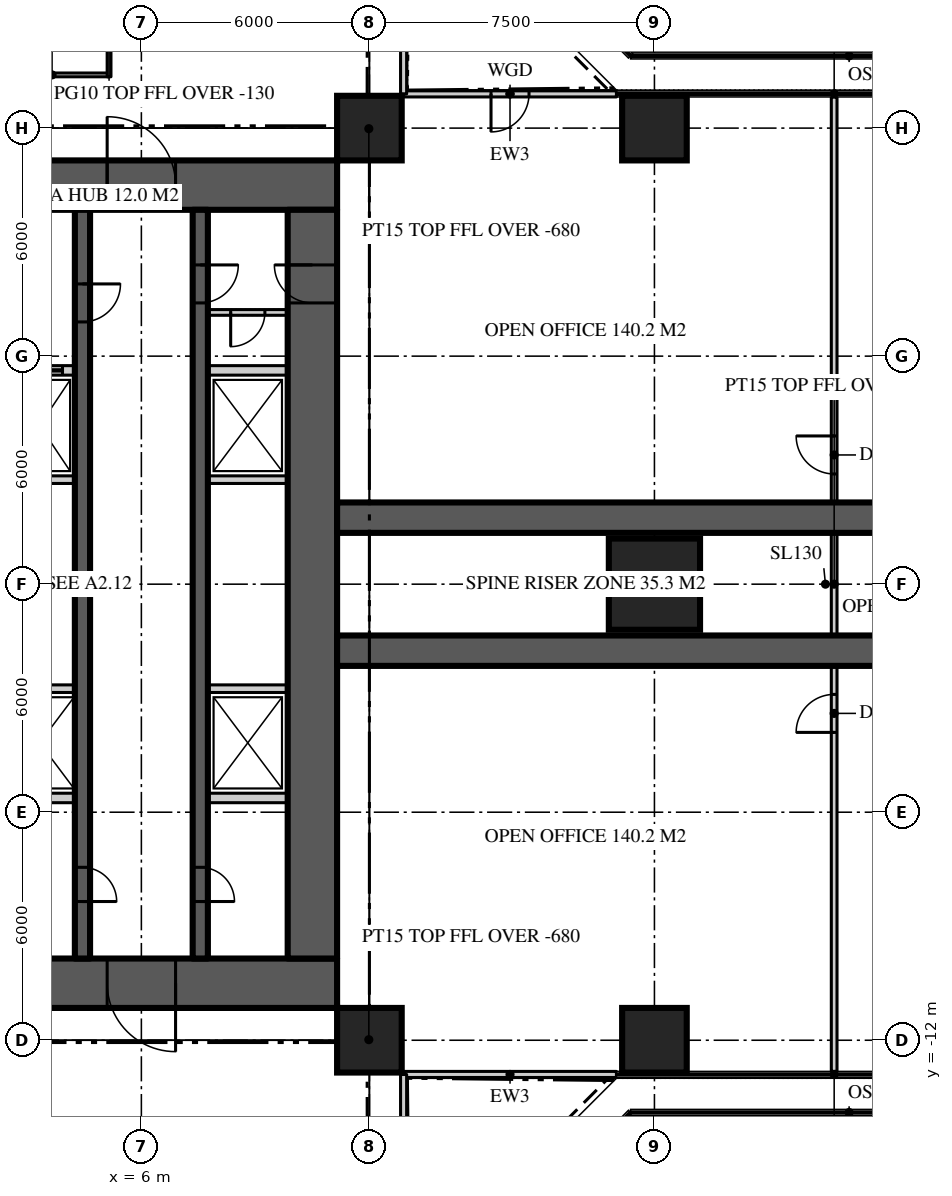
"""IFC4 building model, lengths in metres.
Left out: names, types, materials, properties, quantities, classifications, styles, units other than length and angle.
Written with IfcOpenShell. Run it as: python <this file> out.ifc"""

import sys

from ifc_helpers import new_model, si_unit, direction, frame, frame_2d, origin, origin_2d, place, context, subcontext, project, spatial, rectangle, extrude, element, fill, save


model = new_model("IFC4")
c1 = context("Model", 3, precision=1e-05, world=origin(), true_north=direction((0.0, 1.0)))
c2 = subcontext(c1, "Body", "Model", "MODEL_VIEW")
j1 = project(units=[si_unit("LENGTHUNIT", "METRE"), si_unit("PLANEANGLEUNIT", "RADIAN")], contexts=[c1])
p1 = place(None, origin())
s1 = spatial("IfcSite", under=j1, at=p1, CompositionType="ELEMENT")
p2 = place(p1, origin())
s2 = spatial("IfcBuilding", under=s1, at=p2, CompositionType="ELEMENT")
p3 = place(p2, frame((0.0, 0.0, 74.7)))
s3 = spatial("IfcBuildingStorey", under=s2, at=p3, CompositionType="ELEMENT", Elevation=74.7)
p4 = place(p3, frame((-11.15, 10.5, 0.0), z_axis=(0.0, 0.0, 1.0), x_axis=(1.0, 0.0, 0.0)))
e1 = element("IfcWall", 1, at=p4, inside=s3, PredefinedType="SHEAR", context=c2, shape_type="SweptSolid", body=[
    extrude(rectangle(XDim=22.3, YDim=1.3, at=frame_2d((11.15, 0.0))), origin(), (0.0, 0.0, 1.0), 3.9),
])
p5 = place(p4, frame((4.25, 0.0, 0.0)))
e2 = element("IfcOpeningElement", 2, at=p5, cuts=e1, PredefinedType="OPENING", context=c2, shape_type="SweptSolid", body=[
    extrude(rectangle(XDim=1.8, YDim=2.2, at=frame_2d((0.9, 1.1))), frame((0.0, 0.66, 0.0), z_axis=(0.0, -1.0, 0.0), x_axis=(1.0, 0.0, 0.0)), (0.0, 0.0, 1.0), 1.32),
])
p6 = place(p4, frame((16.25, 0.0, 0.0)))
e3 = element("IfcOpeningElement", 3, at=p6, cuts=e1, PredefinedType="OPENING", context=c2, shape_type="SweptSolid", body=[
    extrude(rectangle(XDim=1.8, YDim=2.2, at=frame_2d((0.9, 1.1))), frame((0.0, 0.66, 0.0), z_axis=(0.0, -1.0, 0.0), x_axis=(1.0, 0.0, 0.0)), (0.0, 0.0, 1.0), 1.32),
])
p7 = place(p3, frame((11.15, -10.5, 0.0), z_axis=(0.0, 0.0, 1.0), x_axis=(-1.0, 0.0, 0.0)))
e4 = element("IfcWall", 4, at=p7, inside=s3, PredefinedType="SHEAR", context=c2, shape_type="SweptSolid", body=[
    extrude(rectangle(XDim=22.3, YDim=1.3, at=frame_2d((11.15, 0.0))), origin(), (0.0, 0.0, 1.0), 3.9),
])
p8 = place(p7, frame((16.25, 0.0, 0.0)))
e5 = element("IfcOpeningElement", 5, at=p8, cuts=e4, PredefinedType="OPENING", context=c2, shape_type="SweptSolid", body=[
    extrude(rectangle(XDim=1.8, YDim=2.2, at=frame_2d((0.9, 1.1))), frame((0.0, 0.66, 0.0), z_axis=(0.0, -1.0, 0.0), x_axis=(1.0, 0.0, 0.0)), (0.0, 0.0, 1.0), 1.32),
])
p9 = place(p7, frame((4.25, 0.0, 0.0)))
e6 = element("IfcOpeningElement", 6, at=p9, cuts=e4, PredefinedType="OPENING", context=c2, shape_type="SweptSolid", body=[
    extrude(rectangle(XDim=1.8, YDim=2.2, at=frame_2d((0.9, 1.1))), frame((0.0, 0.66, 0.0), z_axis=(0.0, -1.0, 0.0), x_axis=(1.0, 0.0, 0.0)), (0.0, 0.0, 1.0), 1.32),
])
p10 = place(p3, frame((10.5, -9.85, 0.0), z_axis=(0.0, 0.0, 1.0), x_axis=(0.0, 1.0, 0.0)))
e7 = element("IfcWall", 7, at=p10, inside=s3, PredefinedType="SHEAR", context=c2, shape_type="SweptSolid", body=[
    extrude(rectangle(XDim=19.7, YDim=1.3, at=frame_2d((9.85, 0.0))), origin(), (0.0, 0.0, 1.0), 3.9),
])
p11 = place(p10, frame((17.25, 0.0, 0.0)))
e8 = element("IfcOpeningElement", 8, at=p11, cuts=e7, PredefinedType="OPENING", context=c2, shape_type="SweptSolid", body=[
    extrude(rectangle(XDim=1.0, YDim=2.2, at=frame_2d((0.5, 1.1))), frame((0.0, 0.66, 0.0), z_axis=(0.0, -1.0, 0.0), x_axis=(1.0, 0.0, 0.0)), (0.0, 0.0, 1.0), 1.32),
])
for number, where, z_axis, x_axis in (
    (9, (11.15, -1.75, 0.0), (0.0, 0.0, 1.0), (1.0, 0.0, 0.0)),
    (10, (11.15, 1.75, 0.0), (0.0, 0.0, 1.0), (1.0, 0.0, 0.0)),
):
    element("IfcWall", number, at=place(p3, frame(where, z_axis=z_axis, x_axis=x_axis)), inside=s3, PredefinedType="SHEAR", context=c2, shape_type="SweptSolid", body=[
        extrude(rectangle(XDim=15.25, YDim=0.8, at=frame_2d((7.625, 0.0))), origin(), (0.0, 0.0, 1.0), 3.9),
    ])
for number, where, z_axis, x_axis in (
    (11, (12.0, -12.0, 0.0), (0.0, 0.0, 1.0), (1.0, 0.0, 0.0)),
    (12, (19.5, -12.0, 0.0), (0.0, 0.0, 1.0), (1.0, 0.0, 0.0)),
):
    element("IfcColumn", number, at=place(p3, frame(where, z_axis=z_axis, x_axis=x_axis)), inside=s3, PredefinedType="COLUMN", context=c2, shape_type="SweptSolid", body=[
        extrude(rectangle(XDim=1.7, YDim=1.7, at=origin_2d()), origin(), (0.0, 0.0, 1.0), 3.9),
    ])
p12 = place(p3, frame((19.5, 0.0, 0.0), z_axis=(0.0, 0.0, 1.0), x_axis=(1.0, 0.0, 0.0)))
e13 = element("IfcColumn", 13, at=p12, inside=s3, PredefinedType="COLUMN", context=c2, shape_type="SweptSolid", body=[
    extrude(rectangle(XDim=2.4, YDim=2.4, at=origin_2d()), origin(), (0.0, 0.0, 1.0), 3.9),
])
for number, where, z_axis, x_axis in (
    (14, (12.0, 12.0, 0.0), (0.0, 0.0, 1.0), (1.0, 0.0, 0.0)),
    (15, (19.5, 12.0, 0.0), (0.0, 0.0, 1.0), (1.0, 0.0, 0.0)),
):
    element("IfcColumn", number, at=place(p3, frame(where, z_axis=z_axis, x_axis=x_axis)), inside=s3, PredefinedType="COLUMN", context=c2, shape_type="SweptSolid", body=[
        extrude(rectangle(XDim=1.7, YDim=1.7, at=origin_2d()), origin(), (0.0, 0.0, 1.0), 3.9),
    ])
p13 = place(p3, frame((12.9, -12.9, 0.0), z_axis=(0.0, 0.0, 1.0), x_axis=(1.0, 0.0, 0.0)))
e16 = element("IfcWall", 16, at=p13, inside=s3, PredefinedType="SOLIDWALL", context=c2, shape_type="SweptSolid", body=[
    extrude(rectangle(XDim=5.6, YDim=0.16, at=frame_2d((2.8, 0.0))), origin(), (0.0, 0.0, 1.0), 3.77),
])
p14 = place(p3, frame((18.5, 12.9, 0.0), z_axis=(0.0, 0.0, 1.0), x_axis=(-1.0, 0.0, 0.0)))
e17 = element("IfcWall", 17, at=p14, inside=s3, PredefinedType="SOLIDWALL", context=c2, shape_type="SweptSolid", body=[
    extrude(rectangle(XDim=5.6, YDim=0.16, at=frame_2d((2.8, 0.0))), origin(), (0.0, 0.0, 1.0), 3.77),
])
p15 = place(p14, frame((2.3, 0.0, 0.0)))
e18 = element("IfcOpeningElement", 18, at=p15, cuts=e17, PredefinedType="OPENING", context=c2, shape_type="SweptSolid", body=[
    extrude(rectangle(XDim=1.0, YDim=2.2, at=frame_2d((0.5, 1.1))), frame((0.0, 0.09, 0.0), z_axis=(0.0, -1.0, 0.0), x_axis=(1.0, 0.0, 0.0)), (0.0, 0.0, 1.0), 0.18),
])
p16 = place(p3, frame((12.9, 12.9, 0.0), z_axis=(0.0, 0.0, 1.0), x_axis=(0.0, 1.0, 0.0)))
e19 = element("IfcWall", 19, at=p16, inside=s3, PredefinedType="SOLIDWALL", context=c2, shape_type="SweptSolid", body=[
    extrude(rectangle(XDim=5.6, YDim=0.16, at=frame_2d((2.8, 0.0))), origin(), (0.0, 0.0, 1.0), 3.77),
])
p17 = place(p3, frame((12.9, -18.5, 0.0), z_axis=(0.0, 0.0, 1.0), x_axis=(0.0, 1.0, 0.0)))
e20 = element("IfcWall", 20, at=p17, inside=s3, PredefinedType="SOLIDWALL", context=c2, shape_type="SweptSolid", body=[
    extrude(rectangle(XDim=5.6, YDim=0.16, at=frame_2d((2.8, 0.0))), origin(), (0.0, 0.0, 1.0), 3.77),
])
p18 = place(p17, frame((2.3, 0.0, 0.0)))
e21 = element("IfcOpeningElement", 21, at=p18, cuts=e20, PredefinedType="OPENING", context=c2, shape_type="SweptSolid", body=[
    extrude(rectangle(XDim=1.0, YDim=2.2, at=frame_2d((0.5, 1.1))), frame((0.0, 0.09, 0.0), z_axis=(0.0, -1.0, 0.0), x_axis=(1.0, 0.0, 0.0)), (0.0, 0.0, 1.0), 0.18),
])
p19 = place(p3, frame((7.55, 9.85, 0.0), z_axis=(0.0, 0.0, 1.0), x_axis=(0.0, -1.0, 0.0)))
e22 = element("IfcWall", 22, at=p19, inside=s3, PredefinedType="SHEAR", context=c2, shape_type="SweptSolid", body=[
    extrude(rectangle(XDim=19.7, YDim=0.4, at=frame_2d((9.85, 0.0))), origin(), (0.0, 0.0, 1.0), 3.9),
])
p20 = place(p19, frame((1.45, 0.0, 0.0)))
e23 = element("IfcOpeningElement", 23, at=p20, cuts=e22, PredefinedType="OPENING", context=c2, shape_type="SweptSolid", body=[
    extrude(rectangle(XDim=1.0, YDim=2.2, at=frame_2d((0.5, 1.1))), frame((0.0, 0.21, 0.0), z_axis=(0.0, -1.0, 0.0), x_axis=(1.0, 0.0, 0.0)), (0.0, 0.0, 1.0), 0.42),
])
p21 = place(p19, frame((17.3, 0.0, 0.0)))
e24 = element("IfcOpeningElement", 24, at=p21, cuts=e22, PredefinedType="OPENING", context=c2, shape_type="SweptSolid", body=[
    extrude(rectangle(XDim=0.9, YDim=2.1, at=frame_2d((0.45, 1.05))), frame((0.0, 0.21, 0.0), z_axis=(0.0, -1.0, 0.0), x_axis=(1.0, 0.0, 0.0)), (0.0, 0.0, 1.0), 0.42),
])
p22 = place(p3, frame((4.45, 9.85, 0.0), z_axis=(0.0, 0.0, 1.0), x_axis=(0.0, -1.0, 0.0)))
e25 = element("IfcWall", 25, at=p22, inside=s3, PredefinedType="SHEAR", context=c2, shape_type="SweptSolid", body=[
    extrude(rectangle(XDim=19.7, YDim=0.4, at=frame_2d((9.85, 0.0))), origin(), (0.0, 0.0, 1.0), 3.9),
])
p23 = place(p22, frame((1.95, 0.0, 0.0)))
e26 = element("IfcOpeningElement", 26, at=p23, cuts=e25, PredefinedType="OPENING", context=c2, shape_type="SweptSolid", body=[
    extrude(rectangle(XDim=1.0, YDim=2.2, at=frame_2d((0.5, 1.1))), frame((0.0, 0.21, 0.0), z_axis=(0.0, -1.0, 0.0), x_axis=(1.0, 0.0, 0.0)), (0.0, 0.0, 1.0), 0.42),
])
p24 = place(p22, frame((17.3, 0.0, 0.0)))
e27 = element("IfcOpeningElement", 27, at=p24, cuts=e25, PredefinedType="OPENING", context=c2, shape_type="SweptSolid", body=[
    extrude(rectangle(XDim=0.9, YDim=2.1, at=frame_2d((0.45, 1.05))), frame((0.0, 0.21, 0.0), z_axis=(0.0, -1.0, 0.0), x_axis=(1.0, 0.0, 0.0)), (0.0, 0.0, 1.0), 0.42),
])
p25 = place(p3, frame((2.4, 5.625, 0.0), z_axis=(0.0, 0.0, 1.0), x_axis=(1.0, 0.0, 0.0)))
e28 = element("IfcWall", 28, at=p25, inside=s3, PredefinedType="SOLIDWALL", context=c2, shape_type="SweptSolid", body=[
    extrude(rectangle(XDim=1.85, YDim=0.25, at=frame_2d((0.925, 0.0))), origin(), (0.0, 0.0, 1.0), 3.7),
])
p26 = place(p25, frame((0.325, 0.0, 0.0)))
e29 = element("IfcOpeningElement", 29, at=p26, cuts=e28, PredefinedType="OPENING", context=c2, shape_type="SweptSolid", body=[
    extrude(rectangle(XDim=1.2, YDim=2.2, at=frame_2d((0.6, 1.1))), frame((0.0, 0.135, 0.0), z_axis=(0.0, -1.0, 0.0), x_axis=(1.0, 0.0, 0.0)), (0.0, 0.0, 1.0), 0.27),
])
p27 = place(p3, frame((7.75, 5.625, 0.0), z_axis=(0.0, 0.0, 1.0), x_axis=(1.0, 0.0, 0.0)))
e30 = element("IfcWall", 30, at=p27, inside=s3, PredefinedType="SOLIDWALL", context=c2, shape_type="SweptSolid", body=[
    extrude(rectangle(XDim=2.1, YDim=0.25, at=frame_2d((1.05, 0.0))), origin(), (0.0, 0.0, 1.0), 3.7),
])
p28 = place(p3, frame((2.4, -5.625, 0.0), z_axis=(0.0, 0.0, 1.0), x_axis=(1.0, 0.0, 0.0)))
e31 = element("IfcWall", 31, at=p28, inside=s3, PredefinedType="SOLIDWALL", context=c2, shape_type="SweptSolid", body=[
    extrude(rectangle(XDim=1.85, YDim=0.25, at=frame_2d((0.925, 0.0))), origin(), (0.0, 0.0, 1.0), 3.7),
])
p29 = place(p3, frame((7.75, -5.625, 0.0), z_axis=(0.0, 0.0, 1.0), x_axis=(1.0, 0.0, 0.0)))
e32 = element("IfcWall", 32, at=p29, inside=s3, PredefinedType="SOLIDWALL", context=c2, shape_type="SweptSolid", body=[
    extrude(rectangle(XDim=2.1, YDim=0.25, at=frame_2d((1.05, 0.0))), origin(), (0.0, 0.0, 1.0), 3.7),
])
p30 = place(p3, frame((2.4, -2.75, 0.0), z_axis=(0.0, 0.0, 1.0), x_axis=(1.0, 0.0, 0.0)))
e33 = element("IfcWall", 33, at=p30, inside=s3, PredefinedType="SOLIDWALL", context=c2, shape_type="SweptSolid", body=[
    extrude(rectangle(XDim=1.85, YDim=0.2, at=frame_2d((0.925, 0.0))), origin(), (0.0, 0.0, 1.0), 3.7),
])
p31 = place(p3, frame((7.75, -2.75, 0.0), z_axis=(0.0, 0.0, 1.0), x_axis=(1.0, 0.0, 0.0)))
e34 = element("IfcWall", 34, at=p31, inside=s3, PredefinedType="SOLIDWALL", context=c2, shape_type="SweptSolid", body=[
    extrude(rectangle(XDim=2.1, YDim=0.2, at=frame_2d((1.05, 0.0))), origin(), (0.0, 0.0, 1.0), 3.7),
])
p32 = place(p3, frame((2.4, 2.75, 0.0), z_axis=(0.0, 0.0, 1.0), x_axis=(1.0, 0.0, 0.0)))
e35 = element("IfcWall", 35, at=p32, inside=s3, PredefinedType="SOLIDWALL", context=c2, shape_type="SweptSolid", body=[
    extrude(rectangle(XDim=1.85, YDim=0.2, at=frame_2d((0.925, 0.0))), origin(), (0.0, 0.0, 1.0), 3.7),
])
p33 = place(p3, frame((7.75, 2.75, 0.0), z_axis=(0.0, 0.0, 1.0), x_axis=(1.0, 0.0, 0.0)))
e36 = element("IfcWall", 36, at=p33, inside=s3, PredefinedType="SOLIDWALL", context=c2, shape_type="SweptSolid", body=[
    extrude(rectangle(XDim=2.1, YDim=0.2, at=frame_2d((1.05, 0.0))), origin(), (0.0, 0.0, 1.0), 3.7),
])
p34 = place(p3, frame((24.229, -12.82, 0.0), z_axis=(0.0, 0.0, 1.0), x_axis=(0.0, 1.0, 0.0)))
e37 = element("IfcWall", 37, at=p34, inside=s3, PredefinedType="PARTITIONING", context=c2, shape_type="SweptSolid", body=[
    extrude(rectangle(XDim=25.64, YDim=0.15, at=frame_2d((12.82, 0.0))), origin(), (0.0, 0.0, 1.0), 3.77),
])
p35 = place(p34, frame((15.72, 0.0, 0.0)))
e38 = element("IfcOpeningElement", 38, at=p35, cuts=e37, PredefinedType="OPENING", context=c2, shape_type="SweptSolid", body=[
    extrude(rectangle(XDim=1.0, YDim=2.2, at=frame_2d((0.5, 1.1))), frame((0.0, 0.085, 0.0), z_axis=(0.0, -1.0, 0.0), x_axis=(1.0, 0.0, 0.0)), (0.0, 0.0, 1.0), 0.17),
])
p36 = place(p34, frame((8.92, 0.0, 0.0)))
e39 = element("IfcOpeningElement", 39, at=p36, cuts=e37, PredefinedType="OPENING", context=c2, shape_type="SweptSolid", body=[
    extrude(rectangle(XDim=1.0, YDim=2.2, at=frame_2d((0.5, 1.1))), frame((0.0, 0.085, 0.0), z_axis=(0.0, -1.0, 0.0), x_axis=(1.0, 0.0, 0.0)), (0.0, 0.0, 1.0), 0.17),
])
p37 = place(p3, frame((2.15, 13.4, 0.0), z_axis=(0.0, 0.0, 1.0), x_axis=(1.0, 0.0, 0.0)))
e40 = element("IfcWall", 40, at=p37, inside=s3, PredefinedType="PARTITIONING", context=c2, shape_type="SweptSolid", body=[
    extrude(rectangle(XDim=3.0, YDim=0.1, at=frame_2d((1.5, 0.0))), origin(), (0.0, 0.0, 1.0), 3.77),
])
p38 = place(p3, frame((5.15, 13.35, 0.0), z_axis=(0.0, 0.0, 1.0), x_axis=(0.0, 1.0, 0.0)))
e41 = element("IfcWall", 41, at=p38, inside=s3, PredefinedType="PARTITIONING", context=c2, shape_type="SweptSolid", body=[
    extrude(rectangle(XDim=4.1, YDim=0.1, at=frame_2d((2.05, 0.0))), origin(), (0.0, 0.0, 1.0), 3.77),
])
p39 = place(p38, frame((1.55, 0.0, 0.0)))
e42 = element("IfcOpeningElement", 42, at=p39, cuts=e41, PredefinedType="OPENING", context=c2, shape_type="SweptSolid", body=[
    extrude(rectangle(XDim=1.0, YDim=2.2, at=frame_2d((0.5, 1.1))), frame((0.0, 0.06, 0.0), z_axis=(0.0, -1.0, 0.0), x_axis=(1.0, 0.0, 0.0)), (0.0, 0.0, 1.0), 0.12),
])
for number, where, z_axis, x_axis in (
    (43, (11.15, 11.15, 0.0), (0.0, 0.0, 1.0), (0.707, 0.707, 0.0)),
    (44, (11.15, -11.15, 0.0), (0.0, 0.0, 1.0), (0.707, -0.707, 0.0)),
):
    element("IfcWall", number, at=place(p3, frame(where, z_axis=z_axis, x_axis=x_axis)), inside=s3, PredefinedType="PARTITIONING", context=c2, shape_type="SweptSolid", body=[
        extrude(rectangle(XDim=2.362, YDim=0.15, at=frame_2d((1.181, 0.0))), origin(), (0.0, 0.0, 1.0), 3.22),
    ])
p40 = place(p3, frame((9.85, 7.15, 0.0), z_axis=(0.0, 0.0, 1.0), x_axis=(-1.0, 0.0, 0.0)))
e45 = element("IfcWall", 45, at=p40, inside=s3, PredefinedType="SOLIDWALL", context=c2, shape_type="SweptSolid", body=[
    extrude(rectangle(XDim=2.1, YDim=0.15, at=frame_2d((1.05, 0.0))), origin(), (0.0, 0.0, 1.0), 3.77),
])
p41 = place(p40, frame((0.6, 0.0, 0.0)))
e46 = element("IfcOpeningElement", 46, at=p41, cuts=e45, PredefinedType="OPENING", context=c2, shape_type="SweptSolid", body=[
    extrude(rectangle(XDim=0.9, YDim=2.1, at=frame_2d((0.45, 1.05))), frame((0.0, 0.085, 0.0), z_axis=(0.0, -1.0, 0.0), x_axis=(1.0, 0.0, 0.0)), (0.0, 0.0, 1.0), 0.17),
])
p42 = place(p15, origin())
e47 = element("IfcDoor", 47, at=p42, inside=s3, OperationType="SINGLE_SWING_RIGHT", PredefinedType="DOOR", context=c2, shape_type="SweptSolid", body=[
    extrude(rectangle(XDim=1.0, YDim=2.2, at=frame_2d((0.5, 1.1))), frame((0.0, 0.025, 0.0), z_axis=(0.0, -1.0, 0.0), x_axis=(1.0, 0.0, 0.0)), (0.0, 0.0, 1.0), 0.05),
])
fill(e18, e47)
p43 = place(p6, origin())
e48 = element("IfcDoor", 48, at=p43, inside=s3, OperationType="DOUBLE_DOOR_DOUBLE_SWING", PredefinedType="DOOR", context=c2, shape_type="SweptSolid", body=[
    extrude(rectangle(XDim=1.8, YDim=2.2, at=frame_2d((0.9, 1.1))), frame((0.0, 0.025, 0.0), z_axis=(0.0, -1.0, 0.0), x_axis=(1.0, 0.0, 0.0)), (0.0, 0.0, 1.0), 0.05),
])
fill(e3, e48)
p44 = place(p9, origin())
e49 = element("IfcDoor", 49, at=p44, inside=s3, OperationType="DOUBLE_DOOR_DOUBLE_SWING", PredefinedType="DOOR", context=c2, shape_type="SweptSolid", body=[
    extrude(rectangle(XDim=1.8, YDim=2.2, at=frame_2d((0.9, 1.1))), frame((0.0, 0.025, 0.0), z_axis=(0.0, -1.0, 0.0), x_axis=(1.0, 0.0, 0.0)), (0.0, 0.0, 1.0), 0.05),
])
fill(e6, e49)
p45 = place(p20, origin())
e50 = element("IfcDoor", 50, at=p45, inside=s3, OperationType="SINGLE_SWING_LEFT", PredefinedType="DOOR", context=c2, shape_type="SweptSolid", body=[
    extrude(rectangle(XDim=1.0, YDim=2.2, at=frame_2d((0.5, 1.1))), frame((0.0, 0.025, 0.0), z_axis=(0.0, -1.0, 0.0), x_axis=(1.0, 0.0, 0.0)), (0.0, 0.0, 1.0), 0.05),
])
fill(e23, e50)
p46 = place(p11, origin())
e51 = element("IfcDoor", 51, at=p46, inside=s3, OperationType="SINGLE_SWING_RIGHT", PredefinedType="DOOR", context=c2, shape_type="SweptSolid", body=[
    extrude(rectangle(XDim=1.0, YDim=2.2, at=frame_2d((0.5, 1.1))), frame((0.0, 0.025, 0.0), z_axis=(0.0, -1.0, 0.0), x_axis=(1.0, 0.0, 0.0)), (0.0, 0.0, 1.0), 0.05),
])
fill(e8, e51)
p47 = place(p23, origin())
e52 = element("IfcDoor", 52, at=p47, inside=s3, OperationType="SINGLE_SWING_LEFT", PredefinedType="DOOR", context=c2, shape_type="SweptSolid", body=[
    extrude(rectangle(XDim=1.0, YDim=2.2, at=frame_2d((0.5, 1.1))), frame((0.0, 0.025, 0.0), z_axis=(0.0, -1.0, 0.0), x_axis=(1.0, 0.0, 0.0)), (0.0, 0.0, 1.0), 0.05),
])
fill(e26, e52)
p48 = place(p21, origin())
e53 = element("IfcDoor", 53, at=p48, inside=s3, OperationType="SINGLE_SWING_RIGHT", PredefinedType="DOOR", context=c2, shape_type="SweptSolid", body=[
    extrude(rectangle(XDim=0.9, YDim=2.1, at=frame_2d((0.45, 1.05))), frame((0.0, 0.025, 0.0), z_axis=(0.0, -1.0, 0.0), x_axis=(1.0, 0.0, 0.0)), (0.0, 0.0, 1.0), 0.05),
])
fill(e24, e53)
p49 = place(p24, origin())
e54 = element("IfcDoor", 54, at=p49, inside=s3, OperationType="SINGLE_SWING_RIGHT", PredefinedType="DOOR", context=c2, shape_type="SweptSolid", body=[
    extrude(rectangle(XDim=0.9, YDim=2.1, at=frame_2d((0.45, 1.05))), frame((0.0, 0.025, 0.0), z_axis=(0.0, -1.0, 0.0), x_axis=(1.0, 0.0, 0.0)), (0.0, 0.0, 1.0), 0.05),
])
fill(e27, e54)
p50 = place(p26, origin())
e55 = element("IfcDoor", 55, at=p50, inside=s3, OperationType="SLIDING_TO_LEFT", PredefinedType="DOOR", context=c2, shape_type="SweptSolid", body=[
    extrude(rectangle(XDim=1.2, YDim=2.2, at=frame_2d((0.6, 1.1))), frame((0.0, 0.025, 0.0), z_axis=(0.0, -1.0, 0.0), x_axis=(1.0, 0.0, 0.0)), (0.0, 0.0, 1.0), 0.05),
])
fill(e29, e55)
p51 = place(p35, origin())
e56 = element("IfcDoor", 56, at=p51, inside=s3, OperationType="SINGLE_SWING_RIGHT", PredefinedType="DOOR", context=c2, shape_type="SweptSolid", body=[
    extrude(rectangle(XDim=1.0, YDim=2.2, at=frame_2d((0.5, 1.1))), frame((0.0, 0.025, 0.0), z_axis=(0.0, -1.0, 0.0), x_axis=(1.0, 0.0, 0.0)), (0.0, 0.0, 1.0), 0.05),
])
fill(e38, e56)
p52 = place(p36, origin())
e57 = element("IfcDoor", 57, at=p52, inside=s3, OperationType="SINGLE_SWING_LEFT", PredefinedType="DOOR", context=c2, shape_type="SweptSolid", body=[
    extrude(rectangle(XDim=1.0, YDim=2.2, at=frame_2d((0.5, 1.1))), frame((0.0, 0.025, 0.0), z_axis=(0.0, -1.0, 0.0), x_axis=(1.0, 0.0, 0.0)), (0.0, 0.0, 1.0), 0.05),
])
fill(e39, e57)
p53 = place(p41, origin())
e58 = element("IfcDoor", 58, at=p53, inside=s3, OperationType="SINGLE_SWING_RIGHT", PredefinedType="DOOR", context=c2, shape_type="SweptSolid", body=[
    extrude(rectangle(XDim=0.9, YDim=2.1, at=frame_2d((0.45, 1.05))), frame((0.0, 0.025, 0.0), z_axis=(0.0, -1.0, 0.0), x_axis=(1.0, 0.0, 0.0)), (0.0, 0.0, 1.0), 0.05),
])
fill(e46, e58)
save(model, sys.argv[1])
